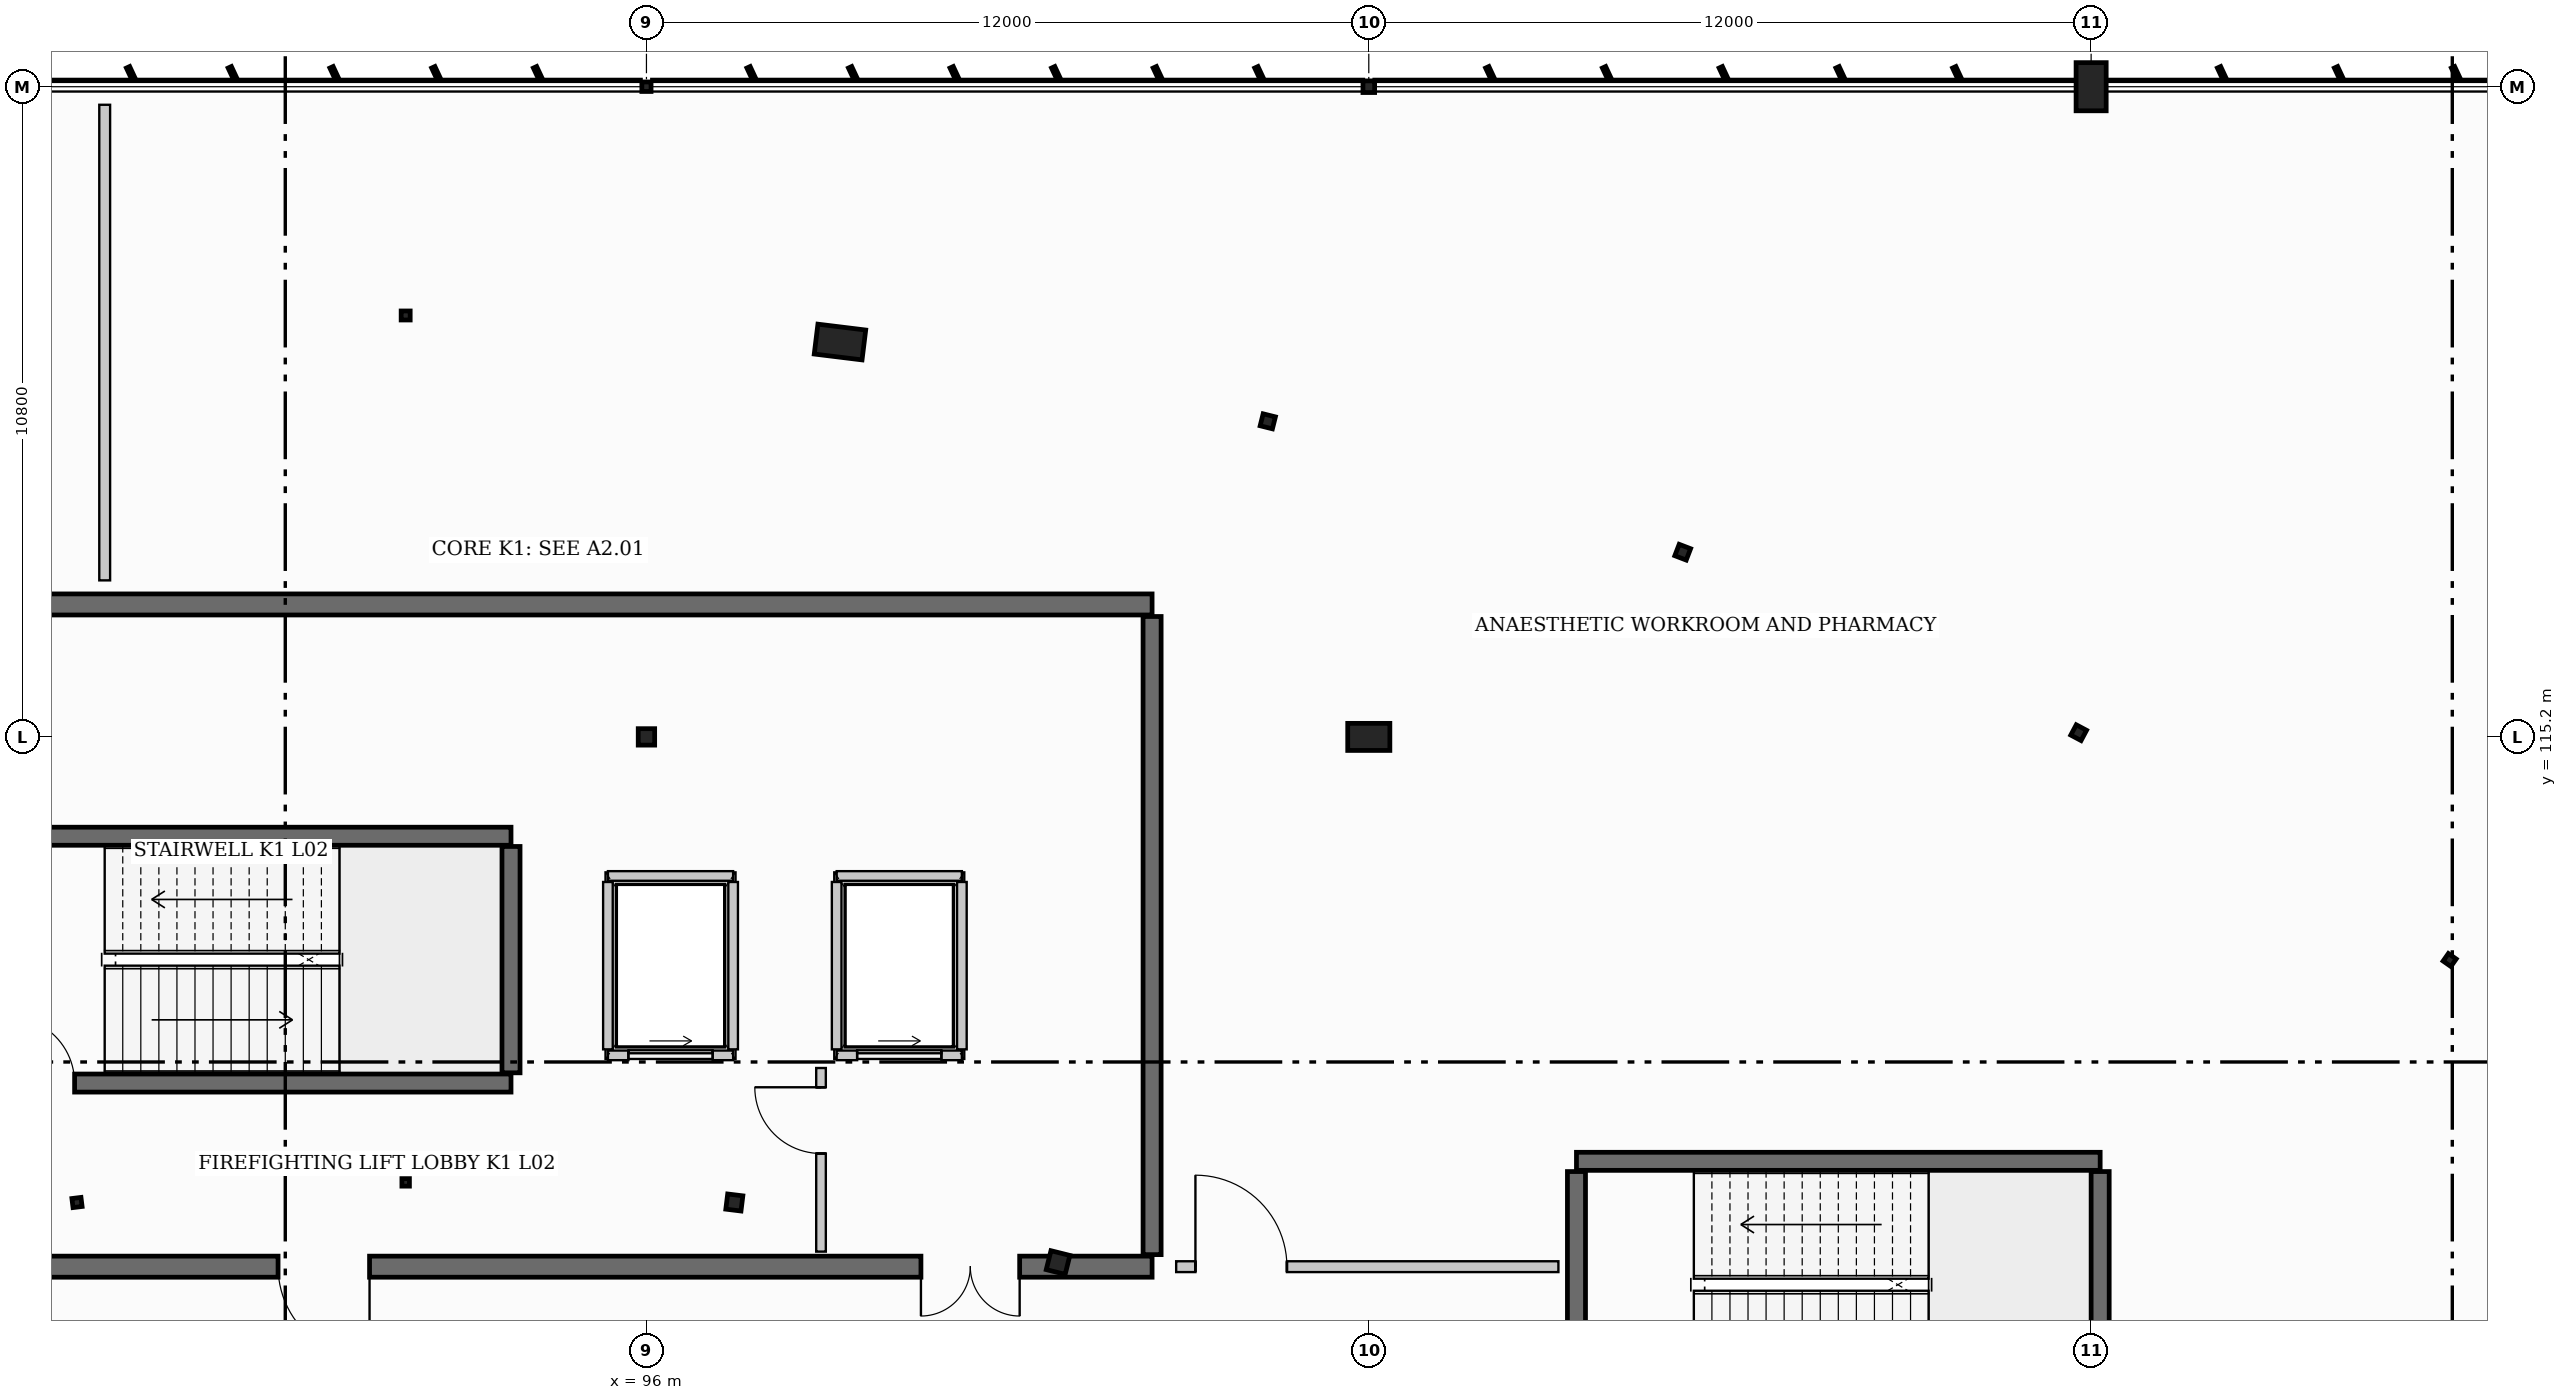
"""IFC4 building model, lengths in metres.
Left out: names, types, materials, properties, quantities, classifications, styles, units other than length and angle.
Written with IfcOpenShell. Run it as: python <this file> out.ifc"""

import sys

from ifc_helpers import new_model, si_unit, direction, frame, frame_2d, origin, origin_2d, place, context, subcontext, project, spatial, rectangle, hollow_rectangle, hollow_circle, i_section, extrude, element, fill, save


model = new_model("IFC4")
c1 = context("Model", 3, precision=1e-05, world=origin(), true_north=direction((0.0, 1.0)))
c2 = subcontext(c1, "Body", "Model", "MODEL_VIEW")
j1 = project(units=[si_unit("LENGTHUNIT", "METRE"), si_unit("PLANEANGLEUNIT", "RADIAN")], contexts=[c1])
p1 = place(None, origin())
s1 = spatial("IfcSite", under=j1, at=p1, CompositionType="ELEMENT")
p2 = place(p1, origin())
s2 = spatial("IfcBuilding", under=s1, at=p2, CompositionType="ELEMENT")
p3 = place(p2, frame((0.0, 0.0, 9.6)))
s3 = spatial("IfcBuildingStorey", under=s2, at=p3, CompositionType="ELEMENT", Elevation=9.6)
p4 = place(p3, frame((96.0, 115.2, 0.0), z_axis=(0.0, 0.0, 1.0), x_axis=(1.0, 0.0, 0.0)))
e1 = element("IfcColumn", 1, at=p4, inside=s3, PredefinedType="COLUMN", context=c2, shape_type="SweptSolid", body=[
    extrude(hollow_circle(Radius=0.136, WallThickness=0.013, at=origin_2d()), origin(), (0.0, 0.0, 1.0), 4.8),
])
p5 = place(p3, frame((96.0, 126.0, 0.0), z_axis=(0.0, 0.0, 1.0), x_axis=(1.0, 0.0, 0.0)))
e2 = element("IfcColumn", 2, at=p5, inside=s3, PredefinedType="COLUMN", context=c2, shape_type="SweptSolid", body=[
    extrude(i_section(OverallWidth=0.153, OverallDepth=0.158, WebThickness=0.007, FlangeThickness=0.01, at=origin_2d()), origin(), (0.0, 0.0, 1.0), 4.8),
])
p6 = place(p3, frame((108.0, 115.2, 0.0), z_axis=(0.0, 0.0, 1.0), x_axis=(0.0, 1.0, 0.0)))
e3 = element("IfcColumn", 3, at=p6, inside=s3, PredefinedType="PILASTER", context=c2, shape_type="SweptSolid", body=[
    extrude(rectangle(XDim=0.45, YDim=0.7, at=origin_2d()), origin(), (0.0, 0.0, 1.0), 4.8),
])
p7 = place(p3, frame((108.0, 126.0, 0.0), z_axis=(0.0, 0.0, 1.0), x_axis=(0.0, 1.0, 0.0)))
e4 = element("IfcColumn", 4, at=p7, inside=s3, PredefinedType="COLUMN", context=c2, shape_type="SweptSolid", body=[
    extrude(hollow_circle(Radius=0.097, WallThickness=0.008, at=origin_2d()), origin(), (0.0, 0.0, 1.0), 4.8),
])
p8 = place(p3, frame((120.0, 126.0, 0.0), z_axis=(0.0, 0.0, 1.0), x_axis=(1.0, 0.0, 0.0)))
e5 = element("IfcColumn", 5, at=p8, inside=s3, PredefinedType="PILASTER", context=c2, shape_type="SweptSolid", body=[
    extrude(rectangle(XDim=0.5, YDim=0.8, at=origin_2d()), origin(), (0.0, 0.0, 1.0), 4.8),
])
p9 = place(p3, frame((86.54, 107.466, 0.0), z_axis=(0.0, 0.0, 1.0), x_axis=(-0.121869343405, 0.992546151641, 0.0)))
e6 = element("IfcColumn", 6, at=p9, inside=s3, PredefinedType="COLUMN", context=c2, shape_type="SweptSolid", body=[
    extrude(i_section(OverallWidth=0.152, OverallDepth=0.152, WebThickness=0.006, FlangeThickness=0.007, at=origin_2d()), origin(), (0.0, 0.0, 1.0), 4.8),
])
p10 = place(p3, frame((92.0, 122.2, 0.0), z_axis=(0.0, 0.0, 1.0), x_axis=(0.0, 1.0, 0.0)))
e7 = element("IfcColumn", 7, at=p10, inside=s3, PredefinedType="COLUMN", context=c2, shape_type="SweptSolid", body=[
    extrude(hollow_rectangle(XDim=0.15, YDim=0.15, WallThickness=0.008, at=origin_2d()), origin(), (0.0, 0.0, 1.0), 4.8),
])
p11 = place(p3, frame((92.0, 107.8, 0.0), z_axis=(0.0, 0.0, 1.0), x_axis=(0.0, 1.0, 0.0)))
e8 = element("IfcColumn", 8, at=p11, inside=s3, PredefinedType="COLUMN", context=c2, shape_type="SweptSolid", body=[
    extrude(hollow_rectangle(XDim=0.125, YDim=0.125, WallThickness=0.006, at=origin_2d()), origin(), (0.0, 0.0, 1.0), 4.8),
])
p12 = place(p3, frame((99.215, 121.759, 0.0), z_axis=(0.0, 0.0, 1.0), x_axis=(0.121869343405, 0.992546151641, 0.0)))
e9 = element("IfcColumn", 9, at=p12, inside=s3, PredefinedType="PILASTER", context=c2, shape_type="SweptSolid", body=[
    extrude(rectangle(XDim=0.5, YDim=0.8, at=origin_2d()), origin(), (0.0, 0.0, 1.0), 4.8),
])
p13 = place(p3, frame((97.46, 107.466, 0.0), z_axis=(0.0, 0.0, 1.0), x_axis=(0.121869343405, 0.992546151641, 0.0)))
e10 = element("IfcColumn", 10, at=p13, inside=s3, PredefinedType="COLUMN", context=c2, shape_type="SweptSolid", body=[
    extrude(i_section(OverallWidth=0.254, OverallDepth=0.254, WebThickness=0.009, FlangeThickness=0.014, at=origin_2d()), origin(), (0.0, 0.0, 1.0), 4.8),
])
p14 = place(p3, frame((106.322, 120.442, 0.0), z_axis=(0.0, 0.0, 1.0), x_axis=(0.2419218956, 0.970295726276, 0.0)))
e11 = element("IfcColumn", 11, at=p14, inside=s3, PredefinedType="COLUMN", context=c2, shape_type="SweptSolid", body=[
    extrude(i_section(OverallWidth=0.205, OverallDepth=0.21, WebThickness=0.009, FlangeThickness=0.014, at=origin_2d()), origin(), (0.0, 0.0, 1.0), 4.8),
])
p15 = place(p3, frame((102.838, 106.469, 0.0), z_axis=(0.0, 0.0, 1.0), x_axis=(0.2419218956, 0.970295726276, 0.0)))
e12 = element("IfcColumn", 12, at=p15, inside=s3, PredefinedType="COLUMN", context=c2, shape_type="SweptSolid", body=[
    extrude(hollow_circle(Radius=0.162, WallThickness=0.013, at=origin_2d()), origin(), (0.0, 0.0, 1.0), 4.8),
])
p16 = place(p3, frame((113.215, 118.268, 0.0), z_axis=(0.0, 0.0, 1.0), x_axis=(0.358367949545, 0.933580426497, 0.0)))
e13 = element("IfcColumn", 13, at=p16, inside=s3, PredefinedType="COLUMN", context=c2, shape_type="SweptSolid", body=[
    extrude(i_section(OverallWidth=0.203, OverallDepth=0.203, WebThickness=0.007, FlangeThickness=0.011, at=origin_2d()), origin(), (0.0, 0.0, 1.0), 4.8),
])
p17 = place(p3, frame((119.793, 115.27, 0.0), z_axis=(0.0, 0.0, 1.0), x_axis=(0.469471562786, 0.882947592859, 0.0)))
e14 = element("IfcColumn", 14, at=p17, inside=s3, PredefinedType="COLUMN", context=c2, shape_type="SweptSolid", body=[
    extrude(hollow_circle(Radius=0.097, WallThickness=0.008, at=origin_2d()), origin(), (0.0, 0.0, 1.0), 4.8),
])
p18 = place(p3, frame((125.956, 111.494, 0.0), z_axis=(0.0, 0.0, 1.0), x_axis=(0.573576436351, 0.819152044289, 0.0)))
e15 = element("IfcColumn", 15, at=p18, inside=s3, PredefinedType="COLUMN", context=c2, shape_type="SweptSolid", body=[
    extrude(i_section(OverallWidth=0.153, OverallDepth=0.158, WebThickness=0.007, FlangeThickness=0.01, at=origin_2d()), origin(), (0.0, 0.0, 1.0), 4.8),
])
p19 = place(p3, frame((84.0, 117.4, 0.0), z_axis=(0.0, 0.0, 1.0), x_axis=(1.0, 0.0, 0.0)))
e16 = element("IfcWall", 16, at=p19, inside=s3, PredefinedType="SHEAR", context=c2, shape_type="SweptSolid", body=[
    extrude(rectangle(XDim=20.4, YDim=0.35, at=frame_2d((10.2, 0.0))), origin(), (0.0, 0.0, 1.0), 4.8),
])
p20 = place(p3, frame((104.4, 106.4, 0.0), z_axis=(0.0, 0.0, 1.0), x_axis=(-1.0, 0.0, 0.0)))
e17 = element("IfcWall", 17, at=p20, inside=s3, PredefinedType="SHEAR", context=c2, shape_type="SweptSolid", body=[
    extrude(rectangle(XDim=20.4, YDim=0.35, at=frame_2d((10.2, 0.0))), origin(), (0.0, 0.0, 1.0), 4.8),
])
p21 = place(p20, frame((2.2, 0.0, 0.0)))
e18 = element("IfcOpeningElement", 18, at=p21, cuts=e17, PredefinedType="OPENING", context=c2, shape_type="SweptSolid", body=[
    extrude(rectangle(XDim=1.64, YDim=2.2, at=frame_2d((0.82, 1.1))), frame((0.0, 0.185, 0.0), z_axis=(0.0, -1.0, 0.0), x_axis=(1.0, 0.0, 0.0)), (0.0, 0.0, 1.0), 0.37),
])
p22 = place(p20, frame((13.0, 0.0, 0.0)))
e19 = element("IfcOpeningElement", 19, at=p22, cuts=e17, PredefinedType="OPENING", context=c2, shape_type="SweptSolid", body=[
    extrude(rectangle(XDim=1.52, YDim=2.16, at=frame_2d((0.76, 1.08))), frame((0.0, 0.185, 0.0), z_axis=(0.0, -1.0, 0.0), x_axis=(1.0, 0.0, 0.0)), (0.0, 0.0, 1.0), 0.37),
])
p23 = place(p3, frame((104.4, 117.2, 0.0), z_axis=(0.0, 0.0, 1.0), x_axis=(0.0, -1.0, 0.0)))
e20 = element("IfcWall", 20, at=p23, inside=s3, PredefinedType="SHEAR", context=c2, shape_type="SweptSolid", body=[
    extrude(rectangle(XDim=10.6, YDim=0.3, at=frame_2d((5.3, 0.0))), origin(), (0.0, 0.0, 1.0), 4.8),
])
p24 = place(p3, frame((85.05, 109.45, 0.0), z_axis=(0.0, 0.0, 1.0), x_axis=(1.0, 0.0, 0.0)))
e21 = element("IfcWall", 21, at=p24, inside=s3, PredefinedType="SHEAR", context=c2, shape_type="SweptSolid", body=[
    extrude(rectangle(XDim=8.7, YDim=0.3, at=frame_2d((4.35, 0.0))), origin(), (0.0, 0.0, 1.0), 4.8),
])
p25 = place(p24, frame((0.35, 0.0, 0.0)))
e22 = element("IfcOpeningElement", 22, at=p25, cuts=e21, PredefinedType="OPENING", context=c2, shape_type="SweptSolid", body=[
    extrude(rectangle(XDim=1.1, YDim=2.15, at=frame_2d((0.55, 1.075))), frame((0.0, 0.16, 0.0), z_axis=(0.0, -1.0, 0.0), x_axis=(1.0, 0.0, 0.0)), (0.0, 0.0, 1.0), 0.32),
])
p26 = place(p3, frame((93.75, 113.55, 0.0), z_axis=(0.0, 0.0, 1.0), x_axis=(-1.0, 0.0, 0.0)))
e23 = element("IfcWall", 23, at=p26, inside=s3, PredefinedType="SHEAR", context=c2, shape_type="SweptSolid", body=[
    extrude(rectangle(XDim=8.7, YDim=0.3, at=frame_2d((4.35, 0.0))), origin(), (0.0, 0.0, 1.0), 4.8),
])
p27 = place(p3, frame((93.75, 109.62, 0.0), z_axis=(0.0, 0.0, 1.0), x_axis=(0.0, 1.0, 0.0)))
e24 = element("IfcWall", 24, at=p27, inside=s3, PredefinedType="SHEAR", context=c2, shape_type="SweptSolid", body=[
    extrude(rectangle(XDim=3.76, YDim=0.3, at=frame_2d((1.88, 0.0))), origin(), (0.0, 0.0, 1.0), 4.8),
])
p28 = place(p3, frame((120.15, 108.15, 0.0), z_axis=(0.0, 0.0, 1.0), x_axis=(-1.0, 0.0, 0.0)))
e25 = element("IfcWall", 25, at=p28, inside=s3, PredefinedType="SHEAR", context=c2, shape_type="SweptSolid", body=[
    extrude(rectangle(XDim=8.7, YDim=0.3, at=frame_2d((4.35, 0.0))), origin(), (0.0, 0.0, 1.0), 4.8),
])
for number, where, z_axis, x_axis in (
    (26, (111.45, 104.22, 0.0), (0.0, 0.0, 1.0), (0.0, 1.0, 0.0)),
    (27, (120.15, 104.22, 0.0), (0.0, 0.0, 1.0), (0.0, 1.0, 0.0)),
):
    element("IfcWall", number, at=place(p3, frame(where, z_axis=z_axis, x_axis=x_axis)), inside=s3, PredefinedType="SHEAR", context=c2, shape_type="SweptSolid", body=[
        extrude(rectangle(XDim=3.76, YDim=0.3, at=frame_2d((1.88, 0.0))), origin(), (0.0, 0.0, 1.0), 4.8),
    ])
p29 = place(p3, frame((95.36, 109.91, 0.0), z_axis=(0.0, 0.0, 1.0), x_axis=(1.0, 0.0, 0.0)))
e28 = element("IfcWall", 28, at=p29, inside=s3, PredefinedType="PARTITIONING", context=c2, shape_type="SweptSolid", body=[
    extrude(rectangle(XDim=2.08, YDim=0.16, at=frame_2d((1.04, 0.0))), origin(), (0.0, 0.0, 1.0), 4.43),
])
p30 = place(p29, frame((0.34, 0.0, 0.0)))
e29 = element("IfcOpeningElement", 29, at=p30, cuts=e28, PredefinedType="OPENING", context=c2, shape_type="SweptSolid", body=[
    extrude(rectangle(XDim=1.4, YDim=2.2, at=frame_2d((0.7, 1.1))), frame((0.0, 0.09, 0.0), z_axis=(0.0, -1.0, 0.0), x_axis=(1.0, 0.0, 0.0)), (0.0, 0.0, 1.0), 0.18),
])
p31 = place(p3, frame((97.44, 112.89, 0.0), z_axis=(0.0, 0.0, 1.0), x_axis=(-1.0, 0.0, 0.0)))
e30 = element("IfcWall", 30, at=p31, inside=s3, PredefinedType="PARTITIONING", context=c2, shape_type="SweptSolid", body=[
    extrude(rectangle(XDim=2.08, YDim=0.16, at=frame_2d((1.04, 0.0))), origin(), (0.0, 0.0, 1.0), 4.43),
])
for number, where, z_axis, x_axis in (
    (31, (95.36, 112.79, 0.0), (0.0, 0.0, 1.0), (0.0, -1.0, 0.0)),
    (32, (97.44, 110.01, 0.0), (0.0, 0.0, 1.0), (0.0, 1.0, 0.0)),
):
    element("IfcWall", number, at=place(p3, frame(where, z_axis=z_axis, x_axis=x_axis)), inside=s3, PredefinedType="PARTITIONING", context=c2, shape_type="SweptSolid", body=[
        extrude(rectangle(XDim=2.78, YDim=0.16, at=frame_2d((1.39, 0.0))), origin(), (0.0, 0.0, 1.0), 4.43),
    ])
p32 = place(p3, frame((99.16, 109.91, 0.0), z_axis=(0.0, 0.0, 1.0), x_axis=(1.0, 0.0, 0.0)))
e33 = element("IfcWall", 33, at=p32, inside=s3, PredefinedType="PARTITIONING", context=c2, shape_type="SweptSolid", body=[
    extrude(rectangle(XDim=2.08, YDim=0.16, at=frame_2d((1.04, 0.0))), origin(), (0.0, 0.0, 1.0), 4.43),
])
p33 = place(p32, frame((0.34, 0.0, 0.0)))
e34 = element("IfcOpeningElement", 34, at=p33, cuts=e33, PredefinedType="OPENING", context=c2, shape_type="SweptSolid", body=[
    extrude(rectangle(XDim=1.4, YDim=2.2, at=frame_2d((0.7, 1.1))), frame((0.0, 0.09, 0.0), z_axis=(0.0, -1.0, 0.0), x_axis=(1.0, 0.0, 0.0)), (0.0, 0.0, 1.0), 0.18),
])
p34 = place(p3, frame((101.24, 112.89, 0.0), z_axis=(0.0, 0.0, 1.0), x_axis=(-1.0, 0.0, 0.0)))
e35 = element("IfcWall", 35, at=p34, inside=s3, PredefinedType="PARTITIONING", context=c2, shape_type="SweptSolid", body=[
    extrude(rectangle(XDim=2.08, YDim=0.16, at=frame_2d((1.04, 0.0))), origin(), (0.0, 0.0, 1.0), 4.43),
])
for number, where, z_axis, x_axis in (
    (36, (99.16, 112.79, 0.0), (0.0, 0.0, 1.0), (0.0, -1.0, 0.0)),
    (37, (101.24, 110.01, 0.0), (0.0, 0.0, 1.0), (0.0, 1.0, 0.0)),
):
    element("IfcWall", number, at=place(p3, frame(where, z_axis=z_axis, x_axis=x_axis)), inside=s3, PredefinedType="PARTITIONING", context=c2, shape_type="SweptSolid", body=[
        extrude(rectangle(XDim=2.78, YDim=0.16, at=frame_2d((1.39, 0.0))), origin(), (0.0, 0.0, 1.0), 4.43),
    ])
p35 = place(p3, frame((98.9, 106.65, 0.0), z_axis=(0.0, 0.0, 1.0), x_axis=(0.0, 1.0, 0.0)))
e38 = element("IfcWall", 38, at=p35, inside=s3, PredefinedType="PARTITIONING", context=c2, shape_type="SweptSolid", body=[
    extrude(rectangle(XDim=3.05, YDim=0.16, at=frame_2d((1.525, 0.0))), origin(), (0.0, 0.0, 1.0), 4.165),
])
p36 = place(p35, frame((1.63, 0.0, 0.0)))
e39 = element("IfcOpeningElement", 39, at=p36, cuts=e38, PredefinedType="OPENING", context=c2, shape_type="SweptSolid", body=[
    extrude(rectangle(XDim=1.1, YDim=2.15, at=frame_2d((0.55, 1.075))), frame((0.0, 0.09, 0.0), z_axis=(0.0, -1.0, 0.0), x_axis=(1.0, 0.0, 0.0)), (0.0, 0.0, 1.0), 0.18),
])
p37 = place(p3, frame((87.0, 117.8, 0.0), z_axis=(0.0, 0.0, 1.0), x_axis=(0.0, 1.0, 0.0)))
e40 = element("IfcWall", 40, at=p37, inside=s3, PredefinedType="PARTITIONING", context=c2, shape_type="SweptSolid", body=[
    extrude(rectangle(XDim=7.9, YDim=0.18, at=frame_2d((3.95, 0.0))), origin(), (0.0, 0.0, 1.0), 4.212),
])
p38 = place(p3, frame((104.8, 106.4, 0.0), z_axis=(0.0, 0.0, 1.0), x_axis=(1.0, 0.0, 0.0)))
e41 = element("IfcWall", 41, at=p38, inside=s3, PredefinedType="PARTITIONING", context=c2, shape_type="SweptSolid", body=[
    extrude(rectangle(XDim=6.35, YDim=0.18, at=frame_2d((3.175, 0.0))), origin(), (0.0, 0.0, 1.0), 3.958),
])
p39 = place(p38, frame((0.32, 0.0, 0.0)))
e42 = element("IfcOpeningElement", 42, at=p39, cuts=e41, PredefinedType="OPENING", context=c2, shape_type="SweptSolid", body=[
    extrude(rectangle(XDim=1.52, YDim=2.16, at=frame_2d((0.76, 1.08))), frame((0.0, 0.1, 0.0), z_axis=(0.0, -1.0, 0.0), x_axis=(1.0, 0.0, 0.0)), (0.0, 0.0, 1.0), 0.2),
])
p40 = place(p30, origin())
e43 = element("IfcDoor", 43, at=p40, inside=s3, OperationType="SLIDING_TO_RIGHT", PredefinedType="DOOR", context=c2, shape_type="SweptSolid", body=[
    extrude(rectangle(XDim=1.4, YDim=2.2, at=frame_2d((0.7, 1.1))), frame((0.0, 0.025, 0.0), z_axis=(0.0, -1.0, 0.0), x_axis=(1.0, 0.0, 0.0)), (0.0, 0.0, 1.0), 0.05),
])
fill(e29, e43)
p41 = place(p33, origin())
e44 = element("IfcDoor", 44, at=p41, inside=s3, OperationType="SLIDING_TO_RIGHT", PredefinedType="DOOR", context=c2, shape_type="SweptSolid", body=[
    extrude(rectangle(XDim=1.4, YDim=2.2, at=frame_2d((0.7, 1.1))), frame((0.0, 0.025, 0.0), z_axis=(0.0, -1.0, 0.0), x_axis=(1.0, 0.0, 0.0)), (0.0, 0.0, 1.0), 0.05),
])
fill(e34, e44)
p42 = place(p25, origin())
e45 = element("IfcDoor", 45, at=p42, inside=s3, OperationType="SINGLE_SWING_LEFT", PredefinedType="DOOR", context=c2, shape_type="SweptSolid", body=[
    extrude(rectangle(XDim=1.1, YDim=2.15, at=frame_2d((0.55, 1.075))), frame((0.0, 0.025, 0.0), z_axis=(0.0, -1.0, 0.0), x_axis=(1.0, 0.0, 0.0)), (0.0, 0.0, 1.0), 0.05),
])
fill(e22, e45)
p43 = place(p21, origin())
e46 = element("IfcDoor", 46, at=p43, inside=s3, OperationType="DOUBLE_DOOR_SINGLE_SWING", PredefinedType="DOOR", context=c2, shape_type="SweptSolid", body=[
    extrude(rectangle(XDim=1.64, YDim=2.2, at=frame_2d((0.82, 1.1))), frame((0.0, 0.025, 0.0), z_axis=(0.0, -1.0, 0.0), x_axis=(1.0, 0.0, 0.0)), (0.0, 0.0, 1.0), 0.05),
])
fill(e18, e46)
p44 = place(p22, origin())
e47 = element("IfcDoor", 47, at=p44, inside=s3, OperationType="SINGLE_SWING_LEFT", PredefinedType="DOOR", context=c2, shape_type="SweptSolid", body=[
    extrude(rectangle(XDim=1.52, YDim=2.16, at=frame_2d((0.76, 1.08))), frame((0.0, 0.025, 0.0), z_axis=(0.0, -1.0, 0.0), x_axis=(1.0, 0.0, 0.0)), (0.0, 0.0, 1.0), 0.05),
])
fill(e19, e47)
p45 = place(p36, origin())
e48 = element("IfcDoor", 48, at=p45, inside=s3, OperationType="SINGLE_SWING_RIGHT", PredefinedType="DOOR", context=c2, shape_type="SweptSolid", body=[
    extrude(rectangle(XDim=1.1, YDim=2.15, at=frame_2d((0.55, 1.075))), frame((0.0, 0.025, 0.0), z_axis=(0.0, -1.0, 0.0), x_axis=(1.0, 0.0, 0.0)), (0.0, 0.0, 1.0), 0.05),
])
fill(e39, e48)
p46 = place(p39, origin())
e49 = element("IfcDoor", 49, at=p46, inside=s3, OperationType="SINGLE_SWING_LEFT", PredefinedType="DOOR", context=c2, shape_type="SweptSolid", body=[
    extrude(rectangle(XDim=1.52, YDim=2.16, at=frame_2d((0.76, 1.08))), frame((0.0, 0.025, 0.0), z_axis=(0.0, -1.0, 0.0), x_axis=(1.0, 0.0, 0.0)), (0.0, 0.0, 1.0), 0.05),
])
fill(e42, e49)
save(model, sys.argv[1])
